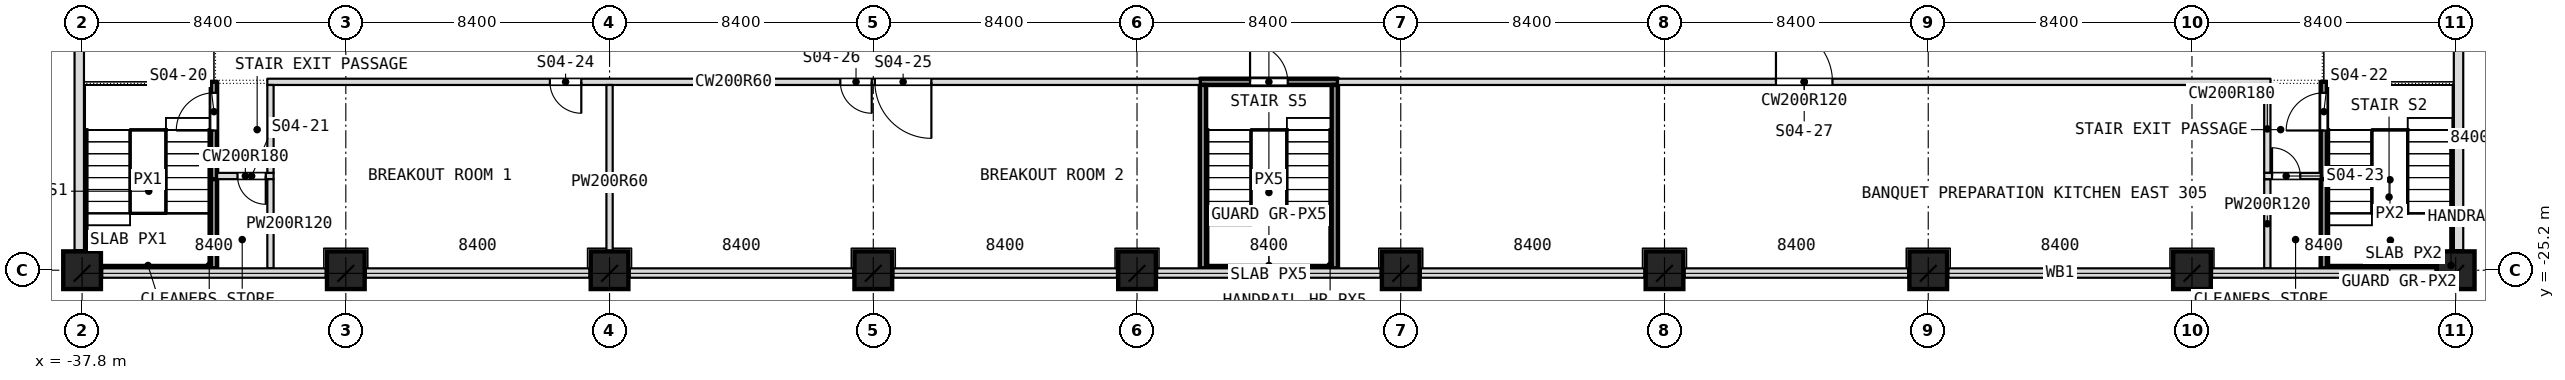
"""IFC4 building model, lengths in metres.
Left out: names, types, materials, properties, quantities, classifications, styles, units other than length and angle.
Written with IfcOpenShell. Run it as: python <this file> out.ifc"""

import sys

from ifc_helpers import new_model, si_unit, direction, frame, frame_2d, origin, origin_2d, place, context, subcontext, project, spatial, polyline, rectangle, outline, extrude, element, fill, save


model = new_model("IFC4")
c1 = context("Model", 3, precision=1e-05, world=origin(), true_north=direction((0.0, 1.0)))
c2 = subcontext(c1, "Body", "Model", "MODEL_VIEW")
j1 = project(units=[si_unit("LENGTHUNIT", "METRE"), si_unit("PLANEANGLEUNIT", "RADIAN")], contexts=[c1])
p1 = place(None, origin())
s1 = spatial("IfcSite", under=j1, at=p1, CompositionType="ELEMENT")
p2 = place(p1, origin())
s2 = spatial("IfcBuilding", under=s1, at=p2, CompositionType="ELEMENT")
p3 = place(p2, frame((0.0, 0.0, 21.0)))
s3 = spatial("IfcBuildingStorey", under=s2, at=p3, CompositionType="ELEMENT", Elevation=21.0)
for number, where, z_axis, x_axis in (
    (1, (-37.8, -25.2, 0.0), (0.0, 0.0, 1.0), (1.0, 0.0, 0.0)),
    (2, (-29.4, -25.2, 0.0), (0.0, 0.0, 1.0), (1.0, 0.0, 0.0)),
    (3, (-21.0, -25.2, 0.0), (0.0, 0.0, 1.0), (1.0, 0.0, 0.0)),
    (4, (-12.6, -25.2, 0.0), (0.0, 0.0, 1.0), (1.0, 0.0, 0.0)),
    (5, (-4.2, -25.2, 0.0), (0.0, 0.0, 1.0), (1.0, 0.0, 0.0)),
    (6, (4.2, -25.2, 0.0), (0.0, 0.0, 1.0), (1.0, 0.0, 0.0)),
    (7, (12.6, -25.2, 0.0), (0.0, 0.0, 1.0), (1.0, 0.0, 0.0)),
    (8, (21.0, -25.2, 0.0), (0.0, 0.0, 1.0), (1.0, 0.0, 0.0)),
    (9, (29.4, -25.2, 0.0), (0.0, 0.0, 1.0), (1.0, 0.0, 0.0)),
    (10, (37.8, -25.2, 0.0), (0.0, 0.0, 1.0), (1.0, 0.0, 0.0)),
):
    element("IfcColumn", number, at=place(p3, frame(where, z_axis=z_axis, x_axis=x_axis)), inside=s3, PredefinedType="COLUMN", context=c2, shape_type="SweptSolid", body=[
        extrude(rectangle(XDim=1.2, YDim=1.2, at=origin_2d()), origin(), (0.0, 0.0, 1.0), 5.0),
    ])
p4 = place(p3, frame((37.8, -14.4, 4.641), z_axis=(1.0, 0.0, 0.0), x_axis=(0.0, 0.799608184746, 0.600522065279)))
e11 = element("IfcWall", 11, at=p4, inside=s3, PredefinedType="SOLIDWALL", context=c2, shape_type="SweptSolid", body=[
    extrude(outline(polyline([(0.0, 0.0), (0.598, -5.551e-17), (-3.622, 3.17), (-6.625, -0.828), (-5.43, -1.726), (-3.625, -0.83), (-1.684, -0.243), (0.0, 0.0)])), origin(), (0.0, 0.0, -1.0), 4.2),
])
p5 = place(p3, frame((-37.8, -14.4, 4.641), z_axis=(-1.0, 0.0, 0.0), x_axis=(0.0, -0.705526339146, -0.708683698678)))
e12 = element("IfcWall", 12, at=p5, inside=s3, PredefinedType="SOLIDWALL", context=c2, shape_type="SweptSolid", body=[
    extrude(outline(polyline([(0.0, 0.0), (1.701, -1.11e-16), (3.707, -0.304), (5.621, -0.932), (6.675, 0.128), (3.132, 3.655), (-0.592, -0.086), (0.0, 0.0)])), origin(), (0.0, 0.0, -1.0), 4.2),
])
p6 = place(p3, frame((33.6, -25.14, 0.0), z_axis=(0.0, 0.0, 1.0), x_axis=(0.0, 1.0, 0.0)))
e13 = element("IfcWall", 13, at=p6, inside=s3, PredefinedType="PARTITIONING", context=c2, shape_type="SweptSolid", body=[
    extrude(rectangle(XDim=3.04, YDim=0.2, at=frame_2d((1.52, 0.0))), origin(), (0.0, 0.0, 1.0), 4.68),
])
p7 = place(p3, frame((33.6, -22.3, 0.0), z_axis=(0.0, 0.0, 1.0), x_axis=(0.0, 1.0, 0.0)))
e14 = element("IfcWall", 14, at=p7, inside=s3, PredefinedType="PARTITIONING", context=c2, shape_type="SweptSolid", body=[
    extrude(rectangle(XDim=3.1, YDim=0.2, at=frame_2d((1.55, 0.0))), origin(), (0.0, 0.0, 1.0), 4.68),
])
p8 = place(p7, frame((1.55, 0.0, 0.0)))
e15 = element("IfcOpeningElement", 15, at=p8, cuts=e14, PredefinedType="OPENING", context=c2, shape_type="SweptSolid", body=[
    extrude(rectangle(XDim=1.2, YDim=2.1, at=frame_2d((0.6, 1.05))), frame((0.0, 0.1, 0.0), z_axis=(0.0, -1.0, 0.0), x_axis=(1.0, 0.0, 0.0)), (0.0, 0.0, 1.0), 0.2),
])
p9 = place(p3, frame((31.8, -25.14, 0.0), z_axis=(0.0, 0.0, 1.0), x_axis=(0.0, 1.0, 0.0)))
e16 = element("IfcWall", 16, at=p9, inside=s3, PredefinedType="PARTITIONING", context=c2, shape_type="SweptSolid", body=[
    extrude(rectangle(XDim=2.84, YDim=0.2, at=frame_2d((1.42, 0.0))), origin(), (0.0, 0.0, 1.0), 4.68),
])
p10 = place(p3, frame((31.8, -22.1, 0.0), z_axis=(0.0, 0.0, 1.0), x_axis=(0.0, 1.0, 0.0)))
e17 = element("IfcWall", 17, at=p10, inside=s3, PredefinedType="PARTITIONING", context=c2, shape_type="SweptSolid", body=[
    extrude(rectangle(XDim=2.8, YDim=0.2, at=frame_2d((1.4, 0.0))), origin(), (0.0, 0.0, 1.0), 4.68),
])
p11 = place(p3, frame((-33.5, -22.2, 0.0), z_axis=(0.0, 0.0, 1.0), x_axis=(1.0, 0.0, 0.0)))
e18 = element("IfcWall", 18, at=p11, inside=s3, PredefinedType="PARTITIONING", context=c2, shape_type="SweptSolid", body=[
    extrude(rectangle(XDim=1.8, YDim=0.2, at=frame_2d((0.9, 0.0))), origin(), (0.0, 0.0, 1.0), 4.68),
])
p12 = place(p11, frame((0.65, 0.0, 0.0)))
e19 = element("IfcOpeningElement", 19, at=p12, cuts=e18, PredefinedType="OPENING", context=c2, shape_type="SweptSolid", body=[
    extrude(rectangle(XDim=0.9, YDim=2.1, at=frame_2d((0.45, 1.05))), frame((0.0, 0.1, 0.0), z_axis=(0.0, -1.0, 0.0), x_axis=(1.0, 0.0, 0.0)), (0.0, 0.0, 1.0), 0.2),
])
p13 = place(p3, frame((31.7, -22.2, 0.0), z_axis=(0.0, 0.0, 1.0), x_axis=(1.0, 0.0, 0.0)))
e20 = element("IfcWall", 20, at=p13, inside=s3, PredefinedType="PARTITIONING", context=c2, shape_type="SweptSolid", body=[
    extrude(rectangle(XDim=1.8, YDim=0.2, at=frame_2d((0.9, 0.0))), origin(), (0.0, 0.0, 1.0), 4.68),
])
p14 = place(p13, frame((0.25, 0.0, 0.0)))
e21 = element("IfcOpeningElement", 21, at=p14, cuts=e20, PredefinedType="OPENING", context=c2, shape_type="SweptSolid", body=[
    extrude(rectangle(XDim=0.9, YDim=2.1, at=frame_2d((0.45, 1.05))), frame((0.0, 0.1, 0.0), z_axis=(0.0, -1.0, 0.0), x_axis=(1.0, 0.0, 0.0)), (0.0, 0.0, 1.0), 0.2),
])
p15 = place(p3, frame((-31.9, -19.2, 0.0), z_axis=(0.0, 0.0, 1.0), x_axis=(1.0, 0.0, 0.0)))
e22 = element("IfcWall", 22, at=p15, inside=s3, PredefinedType="PARTITIONING", context=c2, shape_type="SweptSolid", body=[
    extrude(rectangle(XDim=29.7, YDim=0.2, at=frame_2d((14.85, 0.0))), origin(), (0.0, 0.0, 1.0), 4.68),
])
p16 = place(p15, frame((9.0, 0.0, 0.0)))
e23 = element("IfcOpeningElement", 23, at=p16, cuts=e22, PredefinedType="OPENING", context=c2, shape_type="SweptSolid", body=[
    extrude(rectangle(XDim=1.0, YDim=2.1, at=frame_2d((0.5, 1.05))), frame((0.0, 0.1, 0.0), z_axis=(0.0, -1.0, 0.0), x_axis=(1.0, 0.0, 0.0)), (0.0, 0.0, 1.0), 0.2),
])
p17 = place(p15, frame((19.35, 0.0, 0.0)))
e24 = element("IfcOpeningElement", 24, at=p17, cuts=e22, PredefinedType="OPENING", context=c2, shape_type="SweptSolid", body=[
    extrude(rectangle(XDim=1.8, YDim=2.1, at=frame_2d((0.9, 1.05))), frame((0.0, 0.1, 0.0), z_axis=(0.0, -1.0, 0.0), x_axis=(1.0, 0.0, 0.0)), (0.0, 0.0, 1.0), 0.2),
])
p18 = place(p15, frame((18.25, 0.0, 0.0)))
e25 = element("IfcOpeningElement", 25, at=p18, cuts=e22, PredefinedType="OPENING", context=c2, shape_type="SweptSolid", body=[
    extrude(rectangle(XDim=1.0, YDim=2.1, at=frame_2d((0.5, 1.05))), frame((0.0, 0.1, 0.0), z_axis=(0.0, -1.0, 0.0), x_axis=(1.0, 0.0, 0.0)), (0.0, 0.0, 1.0), 0.2),
])
p19 = place(p3, frame((2.2, -19.2, 0.0), z_axis=(0.0, 0.0, 1.0), x_axis=(1.0, 0.0, 0.0)))
e26 = element("IfcWall", 26, at=p19, inside=s3, PredefinedType="PARTITIONING", context=c2, shape_type="SweptSolid", body=[
    extrude(rectangle(XDim=29.7, YDim=0.2, at=frame_2d((14.85, 0.0))), origin(), (0.0, 0.0, 1.0), 4.68),
])
p20 = place(p19, frame((13.95, 0.0, 0.0)))
e27 = element("IfcOpeningElement", 27, at=p20, cuts=e26, PredefinedType="OPENING", context=c2, shape_type="SweptSolid", body=[
    extrude(rectangle(XDim=1.8, YDim=2.1, at=frame_2d((0.9, 1.05))), frame((0.0, 0.1, 0.0), z_axis=(0.0, -1.0, 0.0), x_axis=(1.0, 0.0, 0.0)), (0.0, 0.0, 1.0), 0.2),
])
p21 = place(p3, frame((-2.2, -19.2, 0.0), z_axis=(0.0, 0.0, 1.0), x_axis=(1.0, 0.0, 0.0)))
e28 = element("IfcWall", 28, at=p21, inside=s3, PredefinedType="PARTITIONING", context=c2, shape_type="SweptSolid", body=[
    extrude(rectangle(XDim=4.4, YDim=0.2, at=frame_2d((2.2, 0.0))), origin(), (0.0, 0.0, 1.0), 4.68),
])
p22 = place(p21, frame((1.6, 0.0, 0.0)))
e29 = element("IfcOpeningElement", 29, at=p22, cuts=e28, PredefinedType="OPENING", context=c2, shape_type="SweptSolid", body=[
    extrude(rectangle(XDim=1.2, YDim=2.1, at=frame_2d((0.6, 1.05))), frame((0.0, 0.1, 0.0), z_axis=(0.0, -1.0, 0.0), x_axis=(1.0, 0.0, 0.0)), (0.0, 0.0, 1.0), 0.2),
])
for number, where, z_axis, x_axis in (
    (30, (2.1, -25.14, 0.0), (0.0, 0.0, 1.0), (0.0, 1.0, 0.0)),
    (31, (-2.1, -25.14, 0.0), (0.0, 0.0, 1.0), (0.0, 1.0, 0.0)),
):
    element("IfcWall", number, at=place(p3, frame(where, z_axis=z_axis, x_axis=x_axis)), inside=s3, PredefinedType="PARTITIONING", context=c2, shape_type="SweptSolid", body=[
        extrude(rectangle(XDim=5.84, YDim=0.2, at=frame_2d((2.92, 0.0))), origin(), (0.0, 0.0, 1.0), 4.68),
    ])
p23 = place(p3, frame((-21.0, -25.5, 0.0), z_axis=(0.0, 0.0, 1.0), x_axis=(0.0, 1.0, 0.0)))
e32 = element("IfcWall", 32, at=p23, inside=s3, PredefinedType="PARTITIONING", context=c2, shape_type="SweptSolid", body=[
    extrude(rectangle(XDim=6.2, YDim=0.2, at=frame_2d((3.1, 0.0))), origin(), (0.0, 0.0, 1.0), 4.68),
])
p24 = place(p3, frame((-31.8, -25.14, 0.0), z_axis=(0.0, 0.0, 1.0), x_axis=(0.0, 1.0, 0.0)))
e33 = element("IfcWall", 33, at=p24, inside=s3, PredefinedType="PARTITIONING", context=c2, shape_type="SweptSolid", body=[
    extrude(rectangle(XDim=2.84, YDim=0.2, at=frame_2d((1.42, 0.0))), origin(), (0.0, 0.0, 1.0), 4.68),
])
p25 = place(p3, frame((-31.8, -22.1, 0.0), z_axis=(0.0, 0.0, 1.0), x_axis=(0.0, 1.0, 0.0)))
e34 = element("IfcWall", 34, at=p25, inside=s3, PredefinedType="PARTITIONING", context=c2, shape_type="SweptSolid", body=[
    extrude(rectangle(XDim=2.8, YDim=0.2, at=frame_2d((1.4, 0.0))), origin(), (0.0, 0.0, 1.0), 4.68),
])
p26 = place(p3, frame((-33.6, -25.14, 0.0), z_axis=(0.0, 0.0, 1.0), x_axis=(0.0, 1.0, 0.0)))
e35 = element("IfcWall", 35, at=p26, inside=s3, PredefinedType="PARTITIONING", context=c2, shape_type="SweptSolid", body=[
    extrude(rectangle(XDim=3.04, YDim=0.2, at=frame_2d((1.52, 0.0))), origin(), (0.0, 0.0, 1.0), 4.68),
])
p27 = place(p3, frame((-33.6, -22.3, 0.0), z_axis=(0.0, 0.0, 1.0), x_axis=(0.0, 1.0, 0.0)))
e36 = element("IfcWall", 36, at=p27, inside=s3, PredefinedType="PARTITIONING", context=c2, shape_type="SweptSolid", body=[
    extrude(rectangle(XDim=3.1, YDim=0.2, at=frame_2d((1.55, 0.0))), origin(), (0.0, 0.0, 1.0), 4.68),
])
p28 = place(p27, frame((1.55, 0.0, 0.0)))
e37 = element("IfcOpeningElement", 37, at=p28, cuts=e36, PredefinedType="OPENING", context=c2, shape_type="SweptSolid", body=[
    extrude(rectangle(XDim=1.2, YDim=2.1, at=frame_2d((0.6, 1.05))), frame((0.0, 0.1, 0.0), z_axis=(0.0, -1.0, 0.0), x_axis=(1.0, 0.0, 0.0)), (0.0, 0.0, 1.0), 0.2),
])
p29 = place(p3, frame((-37.16, -25.29, 0.0), z_axis=(0.0, 0.0, 1.0), x_axis=(1.0, 0.0, 0.0)))
e38 = element("IfcWall", 38, at=p29, inside=s3, PredefinedType="NOTDEFINED", context=c2, shape_type="SweptSolid", body=[
    extrude(rectangle(XDim=7.12, YDim=0.3, at=frame_2d((3.56, 0.0))), origin(), (0.0, 0.0, 1.0), 3.78),
])
for number, where, z_axis, x_axis in (
    (39, (-28.76, -25.29, 0.0), (0.0, 0.0, 1.0), (1.0, 0.0, 0.0)),
    (40, (-20.36, -25.29, 0.0), (0.0, 0.0, 1.0), (1.0, 0.0, 0.0)),
):
    element("IfcWall", number, at=place(p3, frame(where, z_axis=z_axis, x_axis=x_axis)), inside=s3, PredefinedType="NOTDEFINED", context=c2, shape_type="SweptSolid", body=[
        extrude(rectangle(XDim=7.12, YDim=0.3, at=frame_2d((3.56, 0.0))), origin(), (0.0, 0.0, 1.0), 3.78),
    ])
p30 = place(p3, frame((-11.96, -25.29, 0.0), z_axis=(0.0, 0.0, 1.0), x_axis=(1.0, 0.0, 0.0)))
e41 = element("IfcWall", 41, at=p30, inside=s3, PredefinedType="NOTDEFINED", context=c2, shape_type="SweptSolid", body=[
    extrude(rectangle(XDim=7.12, YDim=0.3, at=frame_2d((3.56, 0.0))), origin(), (0.0, 0.0, 1.0), 3.78),
])
p31 = place(p3, frame((-3.56, -25.29, 0.0), z_axis=(0.0, 0.0, 1.0), x_axis=(1.0, 0.0, 0.0)))
e42 = element("IfcWall", 42, at=p31, inside=s3, PredefinedType="NOTDEFINED", context=c2, shape_type="SweptSolid", body=[
    extrude(rectangle(XDim=7.12, YDim=0.3, at=frame_2d((3.56, 0.0))), origin(), (0.0, 0.0, 1.0), 3.78),
])
p32 = place(p3, frame((4.84, -25.29, 0.0), z_axis=(0.0, 0.0, 1.0), x_axis=(1.0, 0.0, 0.0)))
e43 = element("IfcWall", 43, at=p32, inside=s3, PredefinedType="NOTDEFINED", context=c2, shape_type="SweptSolid", body=[
    extrude(rectangle(XDim=7.12, YDim=0.3, at=frame_2d((3.56, 0.0))), origin(), (0.0, 0.0, 1.0), 3.78),
])
for number, where, z_axis, x_axis in (
    (44, (13.24, -25.29, 0.0), (0.0, 0.0, 1.0), (1.0, 0.0, 0.0)),
    (45, (21.64, -25.29, 0.0), (0.0, 0.0, 1.0), (1.0, 0.0, 0.0)),
):
    element("IfcWall", number, at=place(p3, frame(where, z_axis=z_axis, x_axis=x_axis)), inside=s3, PredefinedType="NOTDEFINED", context=c2, shape_type="SweptSolid", body=[
        extrude(rectangle(XDim=7.12, YDim=0.3, at=frame_2d((3.56, 0.0))), origin(), (0.0, 0.0, 1.0), 3.78),
    ])
p33 = place(p3, frame((30.04, -25.29, 0.0), z_axis=(0.0, 0.0, 1.0), x_axis=(1.0, 0.0, 0.0)))
e46 = element("IfcWall", 46, at=p33, inside=s3, PredefinedType="NOTDEFINED", context=c2, shape_type="SweptSolid", body=[
    extrude(rectangle(XDim=7.12, YDim=0.3, at=frame_2d((3.56, 0.0))), origin(), (0.0, 0.0, 1.0), 3.78),
])
for number, where, z_axis, x_axis in (
    (47, (37.89, -24.56, 0.0), (0.0, 0.0, 1.0), (0.0, 1.0, 0.0)),
    (48, (-37.89, -16.8, 0.0), (0.0, 0.0, 1.0), (0.0, -1.0, 0.0)),
):
    element("IfcWall", number, at=place(p3, frame(where, z_axis=z_axis, x_axis=x_axis)), inside=s3, PredefinedType="NOTDEFINED", context=c2, shape_type="SweptSolid", body=[
        extrude(rectangle(XDim=7.76, YDim=0.3, at=frame_2d((3.88, 0.0))), origin(), (0.0, 0.0, 1.0), 3.78),
    ])
p34 = place(p28, origin())
e49 = element("IfcDoor", 49, at=p34, inside=s3, OperationType="SINGLE_SWING_RIGHT", PredefinedType="DOOR", context=c2, shape_type="SweptSolid", body=[
    extrude(rectangle(XDim=1.2, YDim=2.1, at=frame_2d((0.6, 1.05))), frame((0.0, 0.025, 0.0), z_axis=(0.0, -1.0, 0.0), x_axis=(1.0, 0.0, 0.0)), (0.0, 0.0, 1.0), 0.05),
])
fill(e37, e49)
p35 = place(p12, origin())
e50 = element("IfcDoor", 50, at=p35, inside=s3, OperationType="SINGLE_SWING_LEFT", PredefinedType="DOOR", context=c2, shape_type="SweptSolid", body=[
    extrude(rectangle(XDim=0.9, YDim=2.1, at=frame_2d((0.45, 1.05))), frame((0.0, 0.025, 0.0), z_axis=(0.0, -1.0, 0.0), x_axis=(1.0, 0.0, 0.0)), (0.0, 0.0, 1.0), 0.05),
])
fill(e19, e50)
p36 = place(p8, origin())
e51 = element("IfcDoor", 51, at=p36, inside=s3, OperationType="SINGLE_SWING_LEFT", PredefinedType="DOOR", context=c2, shape_type="SweptSolid", body=[
    extrude(rectangle(XDim=1.2, YDim=2.1, at=frame_2d((0.6, 1.05))), frame((0.0, 0.025, 0.0), z_axis=(0.0, -1.0, 0.0), x_axis=(1.0, 0.0, 0.0)), (0.0, 0.0, 1.0), 0.05),
])
fill(e15, e51)
p37 = place(p14, origin())
e52 = element("IfcDoor", 52, at=p37, inside=s3, OperationType="SINGLE_SWING_RIGHT", PredefinedType="DOOR", context=c2, shape_type="SweptSolid", body=[
    extrude(rectangle(XDim=0.9, YDim=2.1, at=frame_2d((0.45, 1.05))), frame((0.0, 0.025, 0.0), z_axis=(0.0, -1.0, 0.0), x_axis=(1.0, 0.0, 0.0)), (0.0, 0.0, 1.0), 0.05),
])
fill(e21, e52)
p38 = place(p16, origin())
e53 = element("IfcDoor", 53, at=p38, inside=s3, OperationType="SINGLE_SWING_RIGHT", PredefinedType="DOOR", context=c2, shape_type="SweptSolid", body=[
    extrude(rectangle(XDim=1.0, YDim=2.1, at=frame_2d((0.5, 1.05))), frame((0.0, 0.025, 0.0), z_axis=(0.0, -1.0, 0.0), x_axis=(1.0, 0.0, 0.0)), (0.0, 0.0, 1.0), 0.05),
])
fill(e23, e53)
p39 = place(p17, origin())
e54 = element("IfcDoor", 54, at=p39, inside=s3, OperationType="DOUBLE_DOOR_SINGLE_SWING", PredefinedType="DOOR", context=c2, shape_type="SweptSolid", body=[
    extrude(rectangle(XDim=1.8, YDim=2.1, at=frame_2d((0.9, 1.05))), frame((0.0, 0.025, 0.0), z_axis=(0.0, -1.0, 0.0), x_axis=(1.0, 0.0, 0.0)), (0.0, 0.0, 1.0), 0.05),
])
fill(e24, e54)
p40 = place(p18, origin())
e55 = element("IfcDoor", 55, at=p40, inside=s3, OperationType="SINGLE_SWING_LEFT", PredefinedType="DOOR", context=c2, shape_type="SweptSolid", body=[
    extrude(rectangle(XDim=1.0, YDim=2.1, at=frame_2d((0.5, 1.05))), frame((0.0, 0.025, 0.0), z_axis=(0.0, -1.0, 0.0), x_axis=(1.0, 0.0, 0.0)), (0.0, 0.0, 1.0), 0.05),
])
fill(e25, e55)
p41 = place(p20, origin())
e56 = element("IfcDoor", 56, at=p41, inside=s3, OperationType="DOUBLE_DOOR_SINGLE_SWING", PredefinedType="DOOR", context=c2, shape_type="SweptSolid", body=[
    extrude(rectangle(XDim=1.8, YDim=2.1, at=frame_2d((0.9, 1.05))), frame((0.0, 0.025, 0.0), z_axis=(0.0, -1.0, 0.0), x_axis=(1.0, 0.0, 0.0)), (0.0, 0.0, 1.0), 0.05),
])
fill(e27, e56)
p42 = place(p22, origin())
e57 = element("IfcDoor", 57, at=p42, inside=s3, OperationType="SINGLE_SWING_RIGHT", PredefinedType="DOOR", context=c2, shape_type="SweptSolid", body=[
    extrude(rectangle(XDim=1.2, YDim=2.1, at=frame_2d((0.6, 1.05))), frame((0.0, 0.025, 0.0), z_axis=(0.0, -1.0, 0.0), x_axis=(1.0, 0.0, 0.0)), (0.0, 0.0, 1.0), 0.05),
])
fill(e29, e57)
save(model, sys.argv[1])
